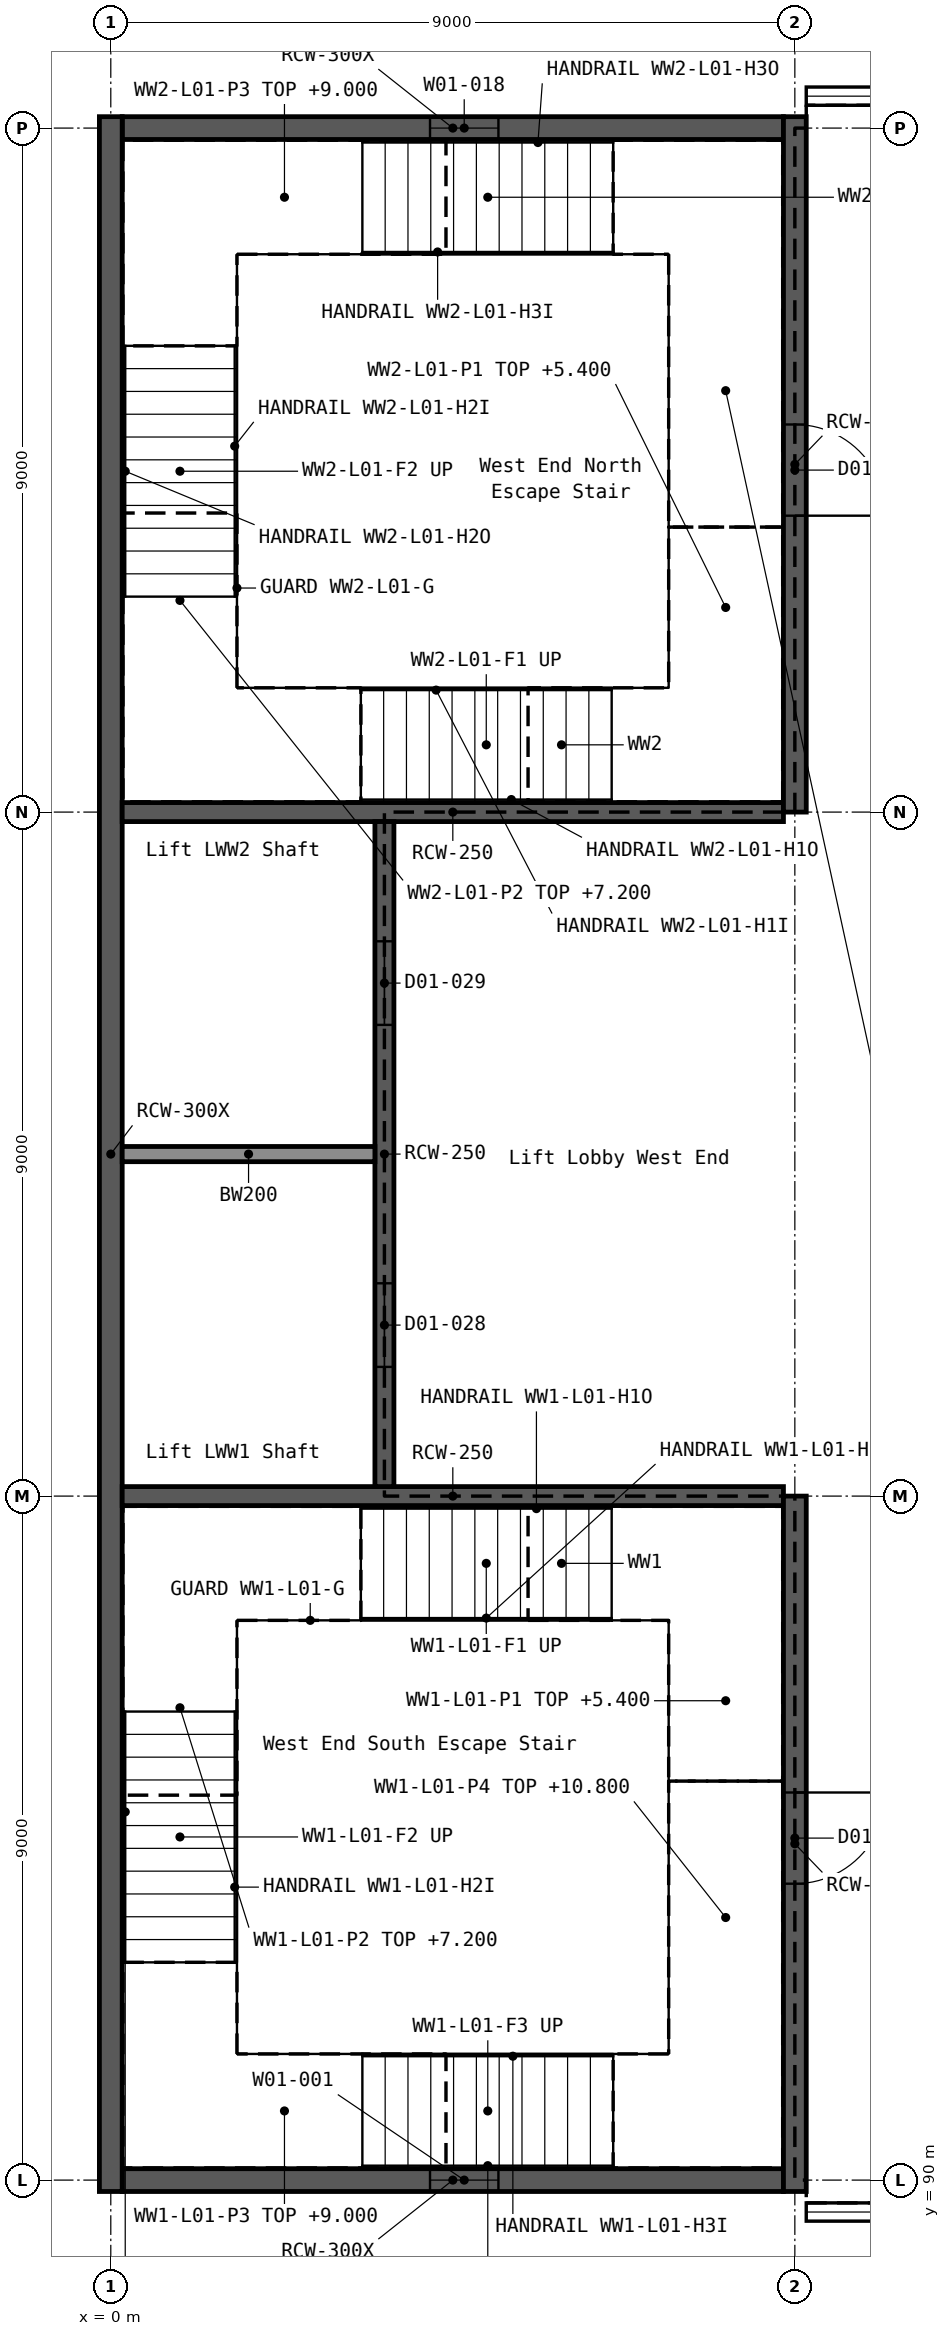
"""IFC4 building model, lengths in metres.
Left out: names, types, materials, properties, quantities, classifications, styles, units other than length and angle.
Written with IfcOpenShell. Run it as: python <this file> out.ifc"""

import sys

from ifc_helpers import new_model, si_unit, direction, frame, frame_2d, origin, place, context, subcontext, project, spatial, rectangle, extrude, element, fill, save


model = new_model("IFC4")
c1 = context("Model", 3, precision=1e-05, world=origin(), true_north=direction((0.0, 1.0)))
c2 = subcontext(c1, "Body", "Model", "MODEL_VIEW")
j1 = project(units=[si_unit("LENGTHUNIT", "METRE"), si_unit("PLANEANGLEUNIT", "RADIAN")], contexts=[c1])
p1 = place(None, origin())
s1 = spatial("IfcSite", under=j1, at=p1, CompositionType="ELEMENT")
p2 = place(p1, origin())
s2 = spatial("IfcBuilding", under=s1, at=p2, CompositionType="ELEMENT")
p3 = place(p2, frame((0.0, 0.0, 5.4)))
s3 = spatial("IfcBuildingStorey", under=s2, at=p3, CompositionType="ELEMENT", Elevation=5.4)
p4 = place(p3, frame((0.15, 90.0, 0.0), z_axis=(0.0, 0.0, 1.0), x_axis=(1.0, 0.0, 0.0)))
e1 = element("IfcWall", 1, at=p4, inside=s3, PredefinedType="SHEAR", context=c2, shape_type="SweptSolid", body=[
    extrude(rectangle(XDim=8.7, YDim=0.3, at=frame_2d((4.35, 0.0))), origin(), (0.0, 0.0, 1.0), 5.4),
])
p5 = place(p4, frame((4.05, 0.0, 1.5)))
e2 = element("IfcOpeningElement", 2, at=p5, cuts=e1, PredefinedType="OPENING", context=c2, shape_type="SweptSolid", body=[
    extrude(rectangle(XDim=0.9, YDim=1.2, at=frame_2d((0.45, 0.6))), frame((0.0, 0.161, 0.0), z_axis=(0.0, -1.0, 0.0), x_axis=(1.0, 0.0, 0.0)), (0.0, 0.0, 1.0), 0.322),
])
p6 = place(p3, frame((0.15, 117.0, 0.0), z_axis=(0.0, 0.0, 1.0), x_axis=(1.0, 0.0, 0.0)))
e3 = element("IfcWall", 3, at=p6, inside=s3, PredefinedType="SHEAR", context=c2, shape_type="SweptSolid", body=[
    extrude(rectangle(XDim=8.7, YDim=0.3, at=frame_2d((4.35, 0.0))), origin(), (0.0, 0.0, 1.0), 5.4),
])
p7 = place(p6, frame((4.05, 0.0, 1.5)))
e4 = element("IfcOpeningElement", 4, at=p7, cuts=e3, PredefinedType="OPENING", context=c2, shape_type="SweptSolid", body=[
    extrude(rectangle(XDim=0.9, YDim=1.2, at=frame_2d((0.45, 0.6))), frame((0.0, 0.161, 0.0), z_axis=(0.0, -1.0, 0.0), x_axis=(1.0, 0.0, 0.0)), (0.0, 0.0, 1.0), 0.322),
])
p8 = place(p3, frame((0.0, 89.85, 0.0), z_axis=(0.0, 0.0, 1.0), x_axis=(0.0, 1.0, 0.0)))
e5 = element("IfcWall", 5, at=p8, inside=s3, PredefinedType="SHEAR", context=c2, shape_type="SweptSolid", body=[
    extrude(rectangle(XDim=27.3, YDim=0.3, at=frame_2d((13.65, 0.0))), origin(), (0.0, 0.0, 1.0), 5.4),
])
for number, where, z_axis, x_axis in (
    (6, (0.15, 99.0, 0.0), (0.0, 0.0, 1.0), (1.0, 0.0, 0.0)),
    (7, (0.15, 108.0, 0.0), (0.0, 0.0, 1.0), (1.0, 0.0, 0.0)),
):
    element("IfcWall", number, at=place(p3, frame(where, z_axis=z_axis, x_axis=x_axis)), inside=s3, PredefinedType="SHEAR", context=c2, shape_type="SweptSolid", body=[
        extrude(rectangle(XDim=8.7, YDim=0.25, at=frame_2d((4.35, 0.0))), origin(), (0.0, 0.0, 1.0), 5.4),
    ])
p9 = place(p3, frame((3.6, 99.125, 0.0), z_axis=(0.0, 0.0, 1.0), x_axis=(0.0, 1.0, 0.0)))
e8 = element("IfcWall", 8, at=p9, inside=s3, PredefinedType="SHEAR", context=c2, shape_type="SweptSolid", body=[
    extrude(rectangle(XDim=8.75, YDim=0.25, at=frame_2d((4.375, 0.0))), origin(), (0.0, 0.0, 1.0), 5.4),
])
p10 = place(p9, frame((1.575, 0.0, 0.0)))
e9 = element("IfcOpeningElement", 9, at=p10, cuts=e8, PredefinedType="OPENING", context=c2, shape_type="SweptSolid", body=[
    extrude(rectangle(XDim=1.1, YDim=2.1, at=frame_2d((0.55, 1.05))), frame((0.0, 0.136, 0.0), z_axis=(0.0, -1.0, 0.0), x_axis=(1.0, 0.0, 0.0)), (0.0, 0.0, 1.0), 0.272),
])
p11 = place(p9, frame((6.075, 0.0, 0.0)))
e10 = element("IfcOpeningElement", 10, at=p11, cuts=e8, PredefinedType="OPENING", context=c2, shape_type="SweptSolid", body=[
    extrude(rectangle(XDim=1.1, YDim=2.1, at=frame_2d((0.55, 1.05))), frame((0.0, 0.136, 0.0), z_axis=(0.0, -1.0, 0.0), x_axis=(1.0, 0.0, 0.0)), (0.0, 0.0, 1.0), 0.272),
])
p12 = place(p3, frame((9.0, 89.85, 0.0), z_axis=(0.0, 0.0, 1.0), x_axis=(0.0, 1.0, 0.0)))
e11 = element("IfcWall", 11, at=p12, inside=s3, PredefinedType="SHEAR", context=c2, shape_type="SweptSolid", body=[
    extrude(rectangle(XDim=9.15, YDim=0.3, at=frame_2d((4.575, 0.0))), origin(), (0.0, 0.0, 1.0), 5.4),
])
p13 = place(p12, frame((4.05, 0.0, 0.0)))
e12 = element("IfcOpeningElement", 12, at=p13, cuts=e11, PredefinedType="OPENING", context=c2, shape_type="SweptSolid", body=[
    extrude(rectangle(XDim=1.2, YDim=2.1, at=frame_2d((0.6, 1.05))), frame((0.0, 0.161, 0.0), z_axis=(0.0, -1.0, 0.0), x_axis=(1.0, 0.0, 0.0)), (0.0, 0.0, 1.0), 0.322),
])
p14 = place(p3, frame((9.0, 108.0, 0.0), z_axis=(0.0, 0.0, 1.0), x_axis=(0.0, 1.0, 0.0)))
e13 = element("IfcWall", 13, at=p14, inside=s3, PredefinedType="SHEAR", context=c2, shape_type="SweptSolid", body=[
    extrude(rectangle(XDim=9.15, YDim=0.3, at=frame_2d((4.575, 0.0))), origin(), (0.0, 0.0, 1.0), 5.4),
])
p15 = place(p14, frame((3.9, 0.0, 0.0)))
e14 = element("IfcOpeningElement", 14, at=p15, cuts=e13, PredefinedType="OPENING", context=c2, shape_type="SweptSolid", body=[
    extrude(rectangle(XDim=1.2, YDim=2.1, at=frame_2d((0.6, 1.05))), frame((0.0, 0.161, 0.0), z_axis=(0.0, -1.0, 0.0), x_axis=(1.0, 0.0, 0.0)), (0.0, 0.0, 1.0), 0.322),
])
p16 = place(p3, frame((0.15, 103.5, 0.0), z_axis=(0.0, 0.0, 1.0), x_axis=(1.0, 0.0, 0.0)))
e15 = element("IfcWall", 15, at=p16, inside=s3, PredefinedType="SOLIDWALL", context=c2, shape_type="SweptSolid", body=[
    extrude(rectangle(XDim=3.325, YDim=0.2, at=frame_2d((1.663, 0.0))), origin(), (0.0, 0.0, 1.0), 5.4),
])
p17 = place(p5, origin())
e16 = element("IfcWindow", 16, at=p17, inside=s3, PartitioningType="SINGLE_PANEL", PredefinedType="WINDOW", context=c2, shape_type="SweptSolid", body=[
    extrude(rectangle(XDim=0.9, YDim=1.2, at=frame_2d((0.45, 0.6))), frame((0.0, 0.03, 0.0), z_axis=(0.0, -1.0, 0.0), x_axis=(1.0, 0.0, 0.0)), (0.0, 0.0, 1.0), 0.06),
])
fill(e2, e16)
p18 = place(p7, origin())
e17 = element("IfcWindow", 17, at=p18, inside=s3, PartitioningType="SINGLE_PANEL", PredefinedType="WINDOW", context=c2, shape_type="SweptSolid", body=[
    extrude(rectangle(XDim=0.9, YDim=1.2, at=frame_2d((0.45, 0.6))), frame((0.0, 0.03, 0.0), z_axis=(0.0, -1.0, 0.0), x_axis=(1.0, 0.0, 0.0)), (0.0, 0.0, 1.0), 0.06),
])
fill(e4, e17)
p19 = place(p13, frame((1.2, 0.0, 0.0), z_axis=(0.0, 0.0, 1.0), x_axis=(-1.0, 0.0, 0.0)))
e18 = element("IfcDoor", 18, at=p19, inside=s3, OperationType="SINGLE_SWING_LEFT", PredefinedType="DOOR", context=c2, shape_type="SweptSolid", body=[
    extrude(rectangle(XDim=1.2, YDim=2.1, at=frame_2d((0.6, 1.05))), frame((0.0, 0.025, 0.0), z_axis=(0.0, -1.0, 0.0), x_axis=(1.0, 0.0, 0.0)), (0.0, 0.0, 1.0), 0.05),
])
fill(e12, e18)
p20 = place(p15, frame((1.2, 0.0, 0.0), z_axis=(0.0, 0.0, 1.0), x_axis=(-1.0, 0.0, 0.0)))
e19 = element("IfcDoor", 19, at=p20, inside=s3, OperationType="SINGLE_SWING_RIGHT", PredefinedType="DOOR", context=c2, shape_type="SweptSolid", body=[
    extrude(rectangle(XDim=1.2, YDim=2.1, at=frame_2d((0.6, 1.05))), frame((0.0, 0.025, 0.0), z_axis=(0.0, -1.0, 0.0), x_axis=(1.0, 0.0, 0.0)), (0.0, 0.0, 1.0), 0.05),
])
fill(e14, e19)
p21 = place(p10, origin())
e20 = element("IfcDoor", 20, at=p21, inside=s3, OperationType="DOUBLE_DOOR_SLIDING", PredefinedType="DOOR", context=c2, shape_type="SweptSolid", body=[
    extrude(rectangle(XDim=1.1, YDim=2.1, at=frame_2d((0.55, 1.05))), frame((0.0, 0.025, 0.0), z_axis=(0.0, -1.0, 0.0), x_axis=(1.0, 0.0, 0.0)), (0.0, 0.0, 1.0), 0.05),
])
fill(e9, e20)
p22 = place(p11, origin())
e21 = element("IfcDoor", 21, at=p22, inside=s3, OperationType="DOUBLE_DOOR_SLIDING", PredefinedType="DOOR", context=c2, shape_type="SweptSolid", body=[
    extrude(rectangle(XDim=1.1, YDim=2.1, at=frame_2d((0.55, 1.05))), frame((0.0, 0.025, 0.0), z_axis=(0.0, -1.0, 0.0), x_axis=(1.0, 0.0, 0.0)), (0.0, 0.0, 1.0), 0.05),
])
fill(e10, e21)
save(model, sys.argv[1])
